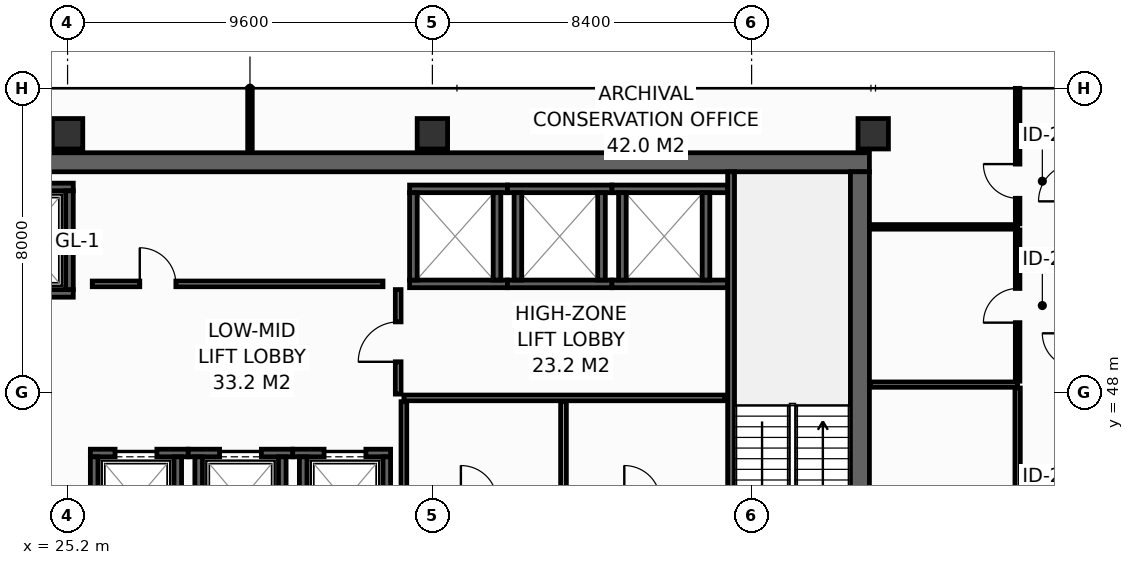
"""IFC4 building model, lengths in metres.
Left out: names, types, materials, properties, quantities, classifications, styles, units other than length and angle.
Written with IfcOpenShell. Run it as: python <this file> out.ifc"""

import sys

from ifc_helpers import new_model, si_unit, direction, frame, frame_2d, origin, origin_2d, place, context, subcontext, project, spatial, rectangle, hollow_rectangle, extrude, element, fill, save


model = new_model("IFC4")
c1 = context("Model", 3, precision=1e-05, world=origin(), true_north=direction((0.0, 1.0)))
c2 = subcontext(c1, "Body", "Model", "MODEL_VIEW")
j1 = project(units=[si_unit("LENGTHUNIT", "METRE"), si_unit("PLANEANGLEUNIT", "RADIAN")], contexts=[c1])
p1 = place(None, origin())
s1 = spatial("IfcSite", under=j1, at=p1, CompositionType="ELEMENT")
p2 = place(p1, origin())
s2 = spatial("IfcBuilding", under=s1, at=p2, CompositionType="ELEMENT")
p3 = place(p2, frame((0.0, 0.0, 186.6)))
s3 = spatial("IfcBuildingStorey", under=s2, at=p3, CompositionType="ELEMENT", Elevation=186.6)
p4 = place(p3, frame((13.6, 54.05, 0.0), z_axis=(0.0, 0.0, 1.0), x_axis=(1.0, 0.0, 0.0)))
e1 = element("IfcWall", 1, at=p4, inside=s3, PredefinedType="SHEAR", context=c2, shape_type="SweptSolid", body=[
    extrude(rectangle(XDim=32.7, YDim=0.5, at=frame_2d((16.35, 0.0))), origin(), (0.0, 0.0, 1.0), 3.55),
])
p5 = place(p3, frame((46.05, 43.4, 0.0), z_axis=(0.0, 0.0, 1.0), x_axis=(0.0, 1.0, 0.0)))
e2 = element("IfcWall", 2, at=p5, inside=s3, PredefinedType="SHEAR", context=c2, shape_type="SweptSolid", body=[
    extrude(rectangle(XDim=10.4, YDim=0.5, at=frame_2d((5.2, 0.0))), origin(), (0.0, 0.0, 1.0), 3.55),
])
for number, where, z_axis, x_axis in (
    (3, (25.2, 54.8, 0.0), (0.0, 0.0, 1.0), (1.0, 0.0, 0.0)),
    (4, (34.8, 54.8, 0.0), (0.0, 0.0, 1.0), (1.0, 0.0, 0.0)),
    (5, (46.4, 54.8, 0.0), (0.0, 0.0, 1.0), (1.0, 0.0, 0.0)),
):
    element("IfcColumn", number, at=place(p3, frame(where, z_axis=z_axis, x_axis=x_axis)), inside=s3, PredefinedType="COLUMN", context=c2, shape_type="SweptSolid", body=[
        extrude(hollow_rectangle(XDim=0.8, YDim=0.8, WallThickness=0.036, at=origin_2d()), origin(), (0.0, 0.0, 1.0), 3.8),
    ])
p6 = place(p3, frame((22.5, 50.6, 0.0), z_axis=(0.0, 0.0, 1.0), x_axis=(1.0, 0.0, 0.0)))
e6 = element("IfcWall", 6, at=p6, inside=s3, PredefinedType="SHEAR", context=c2, shape_type="SweptSolid", body=[
    extrude(rectangle(XDim=2.85, YDim=0.2, at=frame_2d((1.425, 0.0))), origin(), (0.0, 0.0, 1.0), 3.55),
])
p7 = place(p6, frame((0.925, 0.0, 0.0)))
e7 = element("IfcOpeningElement", 7, at=p7, cuts=e6, PredefinedType="OPENING", context=c2, shape_type="SweptSolid", body=[
    extrude(rectangle(XDim=1.25, YDim=2.3, at=frame_2d((0.625, 1.15))), frame((0.0, 0.11, 0.0), z_axis=(0.0, -1.0, 0.0), x_axis=(1.0, 0.0, 0.0)), (0.0, 0.0, 1.0), 0.22),
])
p8 = place(p3, frame((22.5, 53.4, 0.0), z_axis=(0.0, 0.0, 1.0), x_axis=(1.0, 0.0, 0.0)))
e8 = element("IfcWall", 8, at=p8, inside=s3, PredefinedType="SHEAR", context=c2, shape_type="SweptSolid", body=[
    extrude(rectangle(XDim=2.85, YDim=0.2, at=frame_2d((1.425, 0.0))), origin(), (0.0, 0.0, 1.0), 3.55),
])
p9 = place(p3, frame((25.25, 50.7, 0.0), z_axis=(0.0, 0.0, 1.0), x_axis=(0.0, 1.0, 0.0)))
e9 = element("IfcWall", 9, at=p9, inside=s3, PredefinedType="SHEAR", context=c2, shape_type="SweptSolid", body=[
    extrude(rectangle(XDim=2.6, YDim=0.2, at=frame_2d((1.3, 0.0))), origin(), (0.0, 0.0, 1.0), 3.55),
])
p10 = place(p3, frame((25.8, 46.4, 0.0), z_axis=(0.0, 0.0, 1.0), x_axis=(1.0, 0.0, 0.0)))
e10 = element("IfcWall", 10, at=p10, inside=s3, PredefinedType="SHEAR", context=c2, shape_type="SweptSolid", body=[
    extrude(rectangle(XDim=2.575, YDim=0.2, at=frame_2d((1.288, 0.0))), origin(), (0.0, 0.0, 1.0), 3.55),
])
p11 = place(p10, frame((0.65, 0.0, 0.0)))
e11 = element("IfcOpeningElement", 11, at=p11, cuts=e10, PredefinedType="OPENING", context=c2, shape_type="SweptSolid", body=[
    extrude(rectangle(XDim=1.1, YDim=2.2, at=frame_2d((0.55, 1.1))), frame((0.0, 0.11, 0.0), z_axis=(0.0, -1.0, 0.0), x_axis=(1.0, 0.0, 0.0)), (0.0, 0.0, 1.0), 0.22),
])
for number, where, z_axis, x_axis in (
    (12, (25.9, 44.0, 0.0), (0.0, 0.0, 1.0), (0.0, 1.0, 0.0)),
    (13, (28.1, 44.0, 0.0), (0.0, 0.0, 1.0), (0.0, 1.0, 0.0)),
):
    element("IfcWall", number, at=place(p3, frame(where, z_axis=z_axis, x_axis=x_axis)), inside=s3, PredefinedType="SHEAR", context=c2, shape_type="SweptSolid", body=[
        extrude(rectangle(XDim=2.3, YDim=0.2, at=frame_2d((1.15, 0.0))), origin(), (0.0, 0.0, 1.0), 3.55),
    ])
p12 = place(p3, frame((28.375, 46.4, 0.0), z_axis=(0.0, 0.0, 1.0), x_axis=(1.0, 0.0, 0.0)))
e14 = element("IfcWall", 14, at=p12, inside=s3, PredefinedType="SHEAR", context=c2, shape_type="SweptSolid", body=[
    extrude(rectangle(XDim=2.75, YDim=0.2, at=frame_2d((1.375, 0.0))), origin(), (0.0, 0.0, 1.0), 3.55),
])
p13 = place(p12, frame((0.825, 0.0, 0.0)))
e15 = element("IfcOpeningElement", 15, at=p13, cuts=e14, PredefinedType="OPENING", context=c2, shape_type="SweptSolid", body=[
    extrude(rectangle(XDim=1.1, YDim=2.2, at=frame_2d((0.55, 1.1))), frame((0.0, 0.11, 0.0), z_axis=(0.0, -1.0, 0.0), x_axis=(1.0, 0.0, 0.0)), (0.0, 0.0, 1.0), 0.22),
])
for number, where, z_axis, x_axis in (
    (16, (28.65, 44.0, 0.0), (0.0, 0.0, 1.0), (0.0, 1.0, 0.0)),
    (17, (30.85, 44.0, 0.0), (0.0, 0.0, 1.0), (0.0, 1.0, 0.0)),
):
    element("IfcWall", number, at=place(p3, frame(where, z_axis=z_axis, x_axis=x_axis)), inside=s3, PredefinedType="SHEAR", context=c2, shape_type="SweptSolid", body=[
        extrude(rectangle(XDim=2.3, YDim=0.2, at=frame_2d((1.15, 0.0))), origin(), (0.0, 0.0, 1.0), 3.55),
    ])
p14 = place(p3, frame((31.125, 46.4, 0.0), z_axis=(0.0, 0.0, 1.0), x_axis=(1.0, 0.0, 0.0)))
e18 = element("IfcWall", 18, at=p14, inside=s3, PredefinedType="SHEAR", context=c2, shape_type="SweptSolid", body=[
    extrude(rectangle(XDim=2.575, YDim=0.2, at=frame_2d((1.288, 0.0))), origin(), (0.0, 0.0, 1.0), 3.55),
])
p15 = place(p14, frame((0.825, 0.0, 0.0)))
e19 = element("IfcOpeningElement", 19, at=p15, cuts=e18, PredefinedType="OPENING", context=c2, shape_type="SweptSolid", body=[
    extrude(rectangle(XDim=1.1, YDim=2.2, at=frame_2d((0.55, 1.1))), frame((0.0, 0.11, 0.0), z_axis=(0.0, -1.0, 0.0), x_axis=(1.0, 0.0, 0.0)), (0.0, 0.0, 1.0), 0.22),
])
for number, where, z_axis, x_axis in (
    (20, (31.4, 44.0, 0.0), (0.0, 0.0, 1.0), (0.0, 1.0, 0.0)),
    (21, (33.6, 44.0, 0.0), (0.0, 0.0, 1.0), (0.0, 1.0, 0.0)),
):
    element("IfcWall", number, at=place(p3, frame(where, z_axis=z_axis, x_axis=x_axis)), inside=s3, PredefinedType="SHEAR", context=c2, shape_type="SweptSolid", body=[
        extrude(rectangle(XDim=2.3, YDim=0.2, at=frame_2d((1.15, 0.0))), origin(), (0.0, 0.0, 1.0), 3.55),
    ])
for number, where, z_axis, x_axis in (
    (22, (34.2, 50.85, 0.0), (0.0, 0.0, 1.0), (1.0, 0.0, 0.0)),
    (23, (34.2, 53.35, 0.0), (0.0, 0.0, 1.0), (1.0, 0.0, 0.0)),
):
    element("IfcWall", number, at=place(p3, frame(where, z_axis=z_axis, x_axis=x_axis)), inside=s3, PredefinedType="SHEAR", context=c2, shape_type="SweptSolid", body=[
        extrude(rectangle(XDim=2.575, YDim=0.2, at=frame_2d((1.288, 0.0))), origin(), (0.0, 0.0, 1.0), 3.55),
    ])
for number, where, z_axis, x_axis in (
    (24, (34.3, 50.95, 0.0), (0.0, 0.0, 1.0), (0.0, 1.0, 0.0)),
    (25, (36.5, 50.95, 0.0), (0.0, 0.0, 1.0), (0.0, 1.0, 0.0)),
):
    element("IfcWall", number, at=place(p3, frame(where, z_axis=z_axis, x_axis=x_axis)), inside=s3, PredefinedType="SHEAR", context=c2, shape_type="SweptSolid", body=[
        extrude(rectangle(XDim=2.3, YDim=0.2, at=frame_2d((1.15, 0.0))), origin(), (0.0, 0.0, 1.0), 3.55),
    ])
for number, where, z_axis, x_axis in (
    (26, (36.775, 50.85, 0.0), (0.0, 0.0, 1.0), (1.0, 0.0, 0.0)),
    (27, (36.775, 53.35, 0.0), (0.0, 0.0, 1.0), (1.0, 0.0, 0.0)),
):
    element("IfcWall", number, at=place(p3, frame(where, z_axis=z_axis, x_axis=x_axis)), inside=s3, PredefinedType="SHEAR", context=c2, shape_type="SweptSolid", body=[
        extrude(rectangle(XDim=2.75, YDim=0.2, at=frame_2d((1.375, 0.0))), origin(), (0.0, 0.0, 1.0), 3.55),
    ])
for number, where, z_axis, x_axis in (
    (28, (37.05, 50.95, 0.0), (0.0, 0.0, 1.0), (0.0, 1.0, 0.0)),
    (29, (39.25, 50.95, 0.0), (0.0, 0.0, 1.0), (0.0, 1.0, 0.0)),
):
    element("IfcWall", number, at=place(p3, frame(where, z_axis=z_axis, x_axis=x_axis)), inside=s3, PredefinedType="SHEAR", context=c2, shape_type="SweptSolid", body=[
        extrude(rectangle(XDim=2.3, YDim=0.2, at=frame_2d((1.15, 0.0))), origin(), (0.0, 0.0, 1.0), 3.55),
    ])
for number, where, z_axis, x_axis in (
    (30, (39.525, 50.85, 0.0), (0.0, 0.0, 1.0), (1.0, 0.0, 0.0)),
    (31, (39.525, 53.35, 0.0), (0.0, 0.0, 1.0), (1.0, 0.0, 0.0)),
):
    element("IfcWall", number, at=place(p3, frame(where, z_axis=z_axis, x_axis=x_axis)), inside=s3, PredefinedType="SHEAR", context=c2, shape_type="SweptSolid", body=[
        extrude(rectangle(XDim=3.045, YDim=0.2, at=frame_2d((1.522, 0.0))), origin(), (0.0, 0.0, 1.0), 3.55),
    ])
for number, where, z_axis, x_axis in (
    (32, (39.8, 50.95, 0.0), (0.0, 0.0, 1.0), (0.0, 1.0, 0.0)),
    (33, (42.0, 50.95, 0.0), (0.0, 0.0, 1.0), (0.0, 1.0, 0.0)),
):
    element("IfcWall", number, at=place(p3, frame(where, z_axis=z_axis, x_axis=x_axis)), inside=s3, PredefinedType="SHEAR", context=c2, shape_type="SweptSolid", body=[
        extrude(rectangle(XDim=2.3, YDim=0.2, at=frame_2d((1.15, 0.0))), origin(), (0.0, 0.0, 1.0), 3.55),
    ])
p16 = place(p3, frame((42.66, 53.8, 0.0), z_axis=(0.0, 0.0, 1.0), x_axis=(0.0, -1.0, 0.0)))
e34 = element("IfcWall", 34, at=p16, inside=s3, PredefinedType="SHEAR", context=c2, shape_type="SweptSolid", body=[
    extrude(rectangle(XDim=10.4, YDim=0.18, at=frame_2d((5.2, 0.0))), origin(), (0.0, 0.0, 1.0), 3.55),
])
p17 = place(p16, frame((8.99, 0.0, 0.0)))
e35 = element("IfcOpeningElement", 35, at=p17, cuts=e34, PredefinedType="OPENING", context=c2, shape_type="SweptSolid", body=[
    extrude(rectangle(XDim=1.1, YDim=2.15, at=frame_2d((0.55, 1.075))), frame((0.0, 0.1, 0.0), z_axis=(0.0, -1.0, 0.0), x_axis=(1.0, 0.0, 0.0)), (0.0, 0.0, 1.0), 0.2),
])
p18 = place(p3, frame((33.9, 47.95, 0.0), z_axis=(0.0, 0.0, 1.0), x_axis=(0.0, 1.0, 0.0)))
e36 = element("IfcWall", 36, at=p18, inside=s3, PredefinedType="PARTITIONING", context=c2, shape_type="SweptSolid", body=[
    extrude(rectangle(XDim=2.75, YDim=0.15, at=frame_2d((1.375, 0.0))), origin(), (0.0, 0.0, 1.0), 3.55),
])
p19 = place(p18, frame((0.85, 0.0, 0.0)))
e37 = element("IfcOpeningElement", 37, at=p19, cuts=e36, PredefinedType="OPENING", context=c2, shape_type="SweptSolid", body=[
    extrude(rectangle(XDim=1.05, YDim=2.15, at=frame_2d((0.525, 1.075))), frame((0.0, 0.085, 0.0), z_axis=(0.0, -1.0, 0.0), x_axis=(1.0, 0.0, 0.0)), (0.0, 0.0, 1.0), 0.17),
])
p20 = place(p3, frame((34.05, 47.85, 0.0), z_axis=(0.0, 0.0, 1.0), x_axis=(1.0, 0.0, 0.0)))
e38 = element("IfcWall", 38, at=p20, inside=s3, PredefinedType="PARTITIONING", context=c2, shape_type="SweptSolid", body=[
    extrude(rectangle(XDim=8.45, YDim=0.15, at=frame_2d((4.225, 0.0))), origin(), (0.0, 0.0, 1.0), 3.55),
])
for number, where, z_axis, x_axis in (
    (39, (38.25, 45.22, 0.0), (0.0, 0.0, 1.0), (0.0, 1.0, 0.0)),
    (40, (34.05, 45.22, 0.0), (0.0, 0.0, 1.0), (0.0, 1.0, 0.0)),
):
    element("IfcWall", number, at=place(p3, frame(where, z_axis=z_axis, x_axis=x_axis)), inside=s3, PredefinedType="PARTITIONING", context=c2, shape_type="SweptSolid", body=[
        extrude(rectangle(XDim=2.53, YDim=0.15, at=frame_2d((1.265, 0.0))), origin(), (0.0, 0.0, 1.0), 3.55),
    ])
p21 = place(p3, frame((25.85, 50.85, 0.0), z_axis=(0.0, 0.0, 1.0), x_axis=(1.0, 0.0, 0.0)))
e41 = element("IfcWall", 41, at=p21, inside=s3, PredefinedType="PARTITIONING", context=c2, shape_type="SweptSolid", body=[
    extrude(rectangle(XDim=7.65, YDim=0.15, at=frame_2d((3.825, 0.0))), origin(), (0.0, 0.0, 1.0), 3.55),
])
p22 = place(p21, frame((1.25, 0.0, 0.0)))
e42 = element("IfcOpeningElement", 42, at=p22, cuts=e41, PredefinedType="OPENING", context=c2, shape_type="SweptSolid", body=[
    extrude(rectangle(XDim=0.95, YDim=2.15, at=frame_2d((0.475, 1.075))), frame((0.0, 0.085, 0.0), z_axis=(0.0, -1.0, 0.0), x_axis=(1.0, 0.0, 0.0)), (0.0, 0.0, 1.0), 0.17),
])
p23 = place(p3, frame((46.32, 48.2, 0.0), z_axis=(0.0, 0.0, 1.0), x_axis=(1.0, 0.0, 0.0)))
e43 = element("IfcWall", 43, at=p23, inside=s3, PredefinedType="PARTITIONING", context=c2, shape_type="SweptSolid", body=[
    extrude(rectangle(XDim=3.88, YDim=0.14, at=frame_2d((1.94, 0.0))), origin(), (0.0, 0.0, 1.0), 3.55),
])
p24 = place(p3, frame((50.2, 41.04, 0.0), z_axis=(0.0, 0.0, 1.0), x_axis=(0.0, 1.0, 0.0)))
e44 = element("IfcWall", 44, at=p24, inside=s3, PredefinedType="PARTITIONING", context=c2, shape_type="SweptSolid", body=[
    extrude(rectangle(XDim=7.07, YDim=0.14, at=frame_2d((3.535, 0.0))), origin(), (0.0, 0.0, 1.0), 2.835),
])
p25 = place(p24, frame((3.085, 0.0, 0.0)))
e45 = element("IfcOpeningElement", 45, at=p25, cuts=e44, PredefinedType="OPENING", context=c2, shape_type="SweptSolid", body=[
    extrude(rectangle(XDim=0.9, YDim=2.1, at=frame_2d((0.45, 1.05))), frame((0.0, 0.08, 0.0), z_axis=(0.0, -1.0, 0.0), x_axis=(1.0, 0.0, 0.0)), (0.0, 0.0, 1.0), 0.16),
])
p26 = place(p3, frame((46.32, 52.35, 0.0), z_axis=(0.0, 0.0, 1.0), x_axis=(1.0, 0.0, 0.0)))
e46 = element("IfcWall", 46, at=p26, inside=s3, PredefinedType="PARTITIONING", context=c2, shape_type="SweptSolid", body=[
    extrude(rectangle(XDim=3.88, YDim=0.12, at=frame_2d((1.94, 0.0))), origin(), (0.0, 0.0, 1.0), 3.55),
])
p27 = place(p3, frame((30.0, 54.32, 0.0), z_axis=(0.0, 0.0, 1.0), x_axis=(0.0, 1.0, 0.0)))
e47 = element("IfcWall", 47, at=p27, inside=s3, PredefinedType="PARTITIONING", context=c2, shape_type="SweptSolid", body=[
    extrude(rectangle(XDim=1.675, YDim=0.12, at=frame_2d((0.837, 0.0))), origin(), (0.0, 0.0, 1.0), 2.935),
])
p28 = place(p3, frame((50.2, 48.29, 0.0), z_axis=(0.0, 0.0, 1.0), x_axis=(0.0, 1.0, 0.0)))
e48 = element("IfcWall", 48, at=p28, inside=s3, PredefinedType="PARTITIONING", context=c2, shape_type="SweptSolid", body=[
    extrude(rectangle(XDim=3.98, YDim=0.12, at=frame_2d((1.99, 0.0))), origin(), (0.0, 0.0, 1.0), 3.55),
])
p29 = place(p28, frame((1.54, 0.0, 0.0)))
e49 = element("IfcOpeningElement", 49, at=p29, cuts=e48, PredefinedType="OPENING", context=c2, shape_type="SweptSolid", body=[
    extrude(rectangle(XDim=0.9, YDim=2.1, at=frame_2d((0.45, 1.05))), frame((0.0, 0.07, 0.0), z_axis=(0.0, -1.0, 0.0), x_axis=(1.0, 0.0, 0.0)), (0.0, 0.0, 1.0), 0.14),
])
p30 = place(p3, frame((50.2, 52.43, 0.0), z_axis=(0.0, 0.0, 1.0), x_axis=(0.0, 1.0, 0.0)))
e50 = element("IfcWall", 50, at=p30, inside=s3, PredefinedType="PARTITIONING", context=c2, shape_type="SweptSolid", body=[
    extrude(rectangle(XDim=3.565, YDim=0.12, at=frame_2d((1.783, 0.0))), origin(), (0.0, 0.0, 1.0), 2.935),
])
p31 = place(p30, frame((0.672, 0.0, 0.0)))
e51 = element("IfcOpeningElement", 51, at=p31, cuts=e50, PredefinedType="OPENING", context=c2, shape_type="SweptSolid", body=[
    extrude(rectangle(XDim=0.9, YDim=2.1, at=frame_2d((0.45, 1.05))), frame((0.0, 0.07, 0.0), z_axis=(0.0, -1.0, 0.0), x_axis=(1.0, 0.0, 0.0)), (0.0, 0.0, 1.0), 0.14),
])
p32 = place(p11, origin())
e52 = element("IfcDoor", 52, at=p32, inside=s3, OperationType="SLIDING_TO_LEFT", PredefinedType="DOOR", context=c2, shape_type="SweptSolid", body=[
    extrude(rectangle(XDim=1.1, YDim=2.2, at=frame_2d((0.55, 1.1))), frame((0.0, 0.025, 0.0), z_axis=(0.0, -1.0, 0.0), x_axis=(1.0, 0.0, 0.0)), (0.0, 0.0, 1.0), 0.05),
])
fill(e11, e52)
p33 = place(p13, origin())
e53 = element("IfcDoor", 53, at=p33, inside=s3, OperationType="SLIDING_TO_LEFT", PredefinedType="DOOR", context=c2, shape_type="SweptSolid", body=[
    extrude(rectangle(XDim=1.1, YDim=2.2, at=frame_2d((0.55, 1.1))), frame((0.0, 0.025, 0.0), z_axis=(0.0, -1.0, 0.0), x_axis=(1.0, 0.0, 0.0)), (0.0, 0.0, 1.0), 0.05),
])
fill(e15, e53)
p34 = place(p15, origin())
e54 = element("IfcDoor", 54, at=p34, inside=s3, OperationType="SLIDING_TO_LEFT", PredefinedType="DOOR", context=c2, shape_type="SweptSolid", body=[
    extrude(rectangle(XDim=1.1, YDim=2.2, at=frame_2d((0.55, 1.1))), frame((0.0, 0.025, 0.0), z_axis=(0.0, -1.0, 0.0), x_axis=(1.0, 0.0, 0.0)), (0.0, 0.0, 1.0), 0.05),
])
fill(e19, e54)
p35 = place(p19, origin())
e55 = element("IfcDoor", 55, at=p35, inside=s3, OperationType="SINGLE_SWING_LEFT", PredefinedType="DOOR", context=c2, shape_type="SweptSolid", body=[
    extrude(rectangle(XDim=1.05, YDim=2.15, at=frame_2d((0.525, 1.075))), frame((0.0, 0.025, 0.0), z_axis=(0.0, -1.0, 0.0), x_axis=(1.0, 0.0, 0.0)), (0.0, 0.0, 1.0), 0.05),
])
fill(e37, e55)
p36 = place(p22, origin())
e56 = element("IfcDoor", 56, at=p36, inside=s3, OperationType="SINGLE_SWING_LEFT", PredefinedType="DOOR", context=c2, shape_type="SweptSolid", body=[
    extrude(rectangle(XDim=0.95, YDim=2.15, at=frame_2d((0.475, 1.075))), frame((0.0, 0.025, 0.0), z_axis=(0.0, -1.0, 0.0), x_axis=(1.0, 0.0, 0.0)), (0.0, 0.0, 1.0), 0.05),
])
fill(e42, e56)
p37 = place(p29, origin())
e57 = element("IfcDoor", 57, at=p37, inside=s3, OperationType="SINGLE_SWING_LEFT", PredefinedType="DOOR", context=c2, shape_type="SweptSolid", body=[
    extrude(rectangle(XDim=0.9, YDim=2.1, at=frame_2d((0.45, 1.05))), frame((0.0, 0.025, 0.0), z_axis=(0.0, -1.0, 0.0), x_axis=(1.0, 0.0, 0.0)), (0.0, 0.0, 1.0), 0.05),
])
fill(e49, e57)
p38 = place(p31, origin())
e58 = element("IfcDoor", 58, at=p38, inside=s3, OperationType="SINGLE_SWING_RIGHT", PredefinedType="DOOR", context=c2, shape_type="SweptSolid", body=[
    extrude(rectangle(XDim=0.9, YDim=2.1, at=frame_2d((0.45, 1.05))), frame((0.0, 0.025, 0.0), z_axis=(0.0, -1.0, 0.0), x_axis=(1.0, 0.0, 0.0)), (0.0, 0.0, 1.0), 0.05),
])
fill(e51, e58)
save(model, sys.argv[1])
